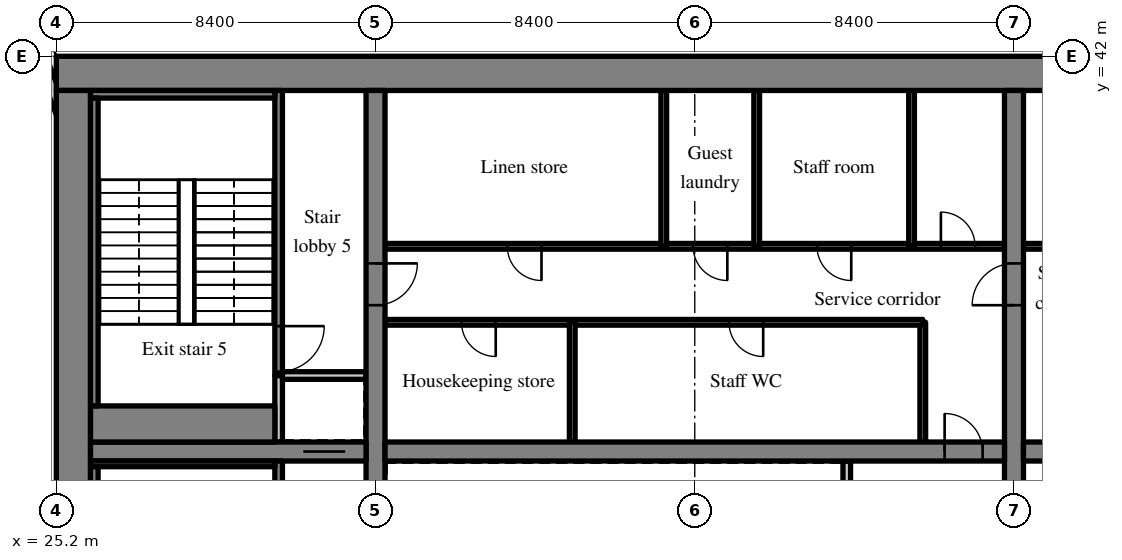
"""IFC4 building model, lengths in metres.
Left out: names, types, materials, properties, quantities, classifications, styles, units other than length and angle.
Written with IfcOpenShell. Run it as: python <this file> out.ifc"""

import sys

from ifc_helpers import new_model, si_unit, direction, frame, frame_2d, origin, place, context, subcontext, project, spatial, rectangle, extrude, source, transform, mapped, element, fill, save


model = new_model("IFC4")
c1 = context("Model", 3, precision=1e-05, world=origin(), true_north=direction((0.0, 1.0)))
c2 = subcontext(c1, "Body", "Model", "MODEL_VIEW")
j1 = project(units=[si_unit("LENGTHUNIT", "METRE"), si_unit("PLANEANGLEUNIT", "RADIAN")], contexts=[c1])
p1 = place(None, origin())
s1 = spatial("IfcSite", under=j1, at=p1, CompositionType="ELEMENT")
p2 = place(p1, origin())
s2 = spatial("IfcBuilding", under=s1, at=p2, CompositionType="ELEMENT")
p3 = place(p2, frame((0.0, 0.0, 91.4)))
s3 = spatial("IfcBuildingStorey", under=s2, at=p3, CompositionType="ELEMENT", Elevation=91.4)
m1 = source(origin(), c2, "Body", "SweptSolid", [
    extrude(rectangle(XDim=50.4, YDim=0.9, at=frame_2d((25.2, 0.0))), origin(), (0.0, 0.0, 1.0), 3.52),
])
p4 = place(p3, frame((25.2, 41.55, 0.0), z_axis=(0.0, 0.0, 1.0), x_axis=(1.0, 0.0, 0.0)))
e1 = element("IfcWall", 1, at=p4, inside=s3, PredefinedType="SHEAR", context=c2, shape_type="MappedRepresentation", body=[
    mapped(m1, transform((0.0, 0.0, 0.0), scale=1.0)),
])
m2 = source(origin(), c2, "Body", "SweptSolid", [
    extrude(rectangle(XDim=18.2, YDim=0.9, at=frame_2d((9.1, 0.0))), origin(), (0.0, 0.0, 1.0), 3.52),
])
p5 = place(p3, frame((25.65, 22.9, 0.0), z_axis=(0.0, 0.0, 1.0), x_axis=(0.0, 1.0, 0.0)))
e2 = element("IfcWall", 2, at=p5, inside=s3, PredefinedType="SHEAR", context=c2, shape_type="MappedRepresentation", body=[
    mapped(m2, transform((0.0, 0.0, 0.0), scale=1.0)),
])
m3 = source(origin(), c2, "Body", "SweptSolid", [
    extrude(rectangle(XDim=18.2, YDim=0.5, at=frame_2d((9.1, 0.0))), origin(), (0.0, 0.0, 1.0), 3.52),
])
p6 = place(p3, frame((33.6, 22.9, 0.0), z_axis=(0.0, 0.0, 1.0), x_axis=(0.0, 1.0, 0.0)))
e3 = element("IfcWall", 3, at=p6, inside=s3, PredefinedType="SHEAR", context=c2, shape_type="MappedRepresentation", body=[
    mapped(m3, transform((0.0, 0.0, 0.0), scale=1.0)),
])
m4 = source(origin(), c2, "Body", "SweptSolid", [
    extrude(rectangle(XDim=1.1, YDim=2.1, at=frame_2d((0.55, 1.05))), frame((0.0, 0.26, 0.0), z_axis=(0.0, -1.0, 0.0), x_axis=(1.0, 0.0, 0.0)), (0.0, 0.0, 1.0), 0.52),
])
p7 = place(p6, frame((12.55, 0.0, 0.0)))
e4 = element("IfcOpeningElement", 4, at=p7, cuts=e3, PredefinedType="OPENING", context=c2, shape_type="MappedRepresentation", body=[
    mapped(m4, transform((0.0, 0.0, 0.0), scale=1.0)),
])
p8 = place(p3, frame((50.4, 22.9, 0.0), z_axis=(0.0, 0.0, 1.0), x_axis=(0.0, 1.0, 0.0)))
e5 = element("IfcWall", 5, at=p8, inside=s3, PredefinedType="SHEAR", context=c2, shape_type="MappedRepresentation", body=[
    mapped(m3, transform((0.0, 0.0, 0.0), scale=1.0)),
])
p9 = place(p8, frame((12.55, 0.0, 0.0)))
e6 = element("IfcOpeningElement", 6, at=p9, cuts=e5, PredefinedType="OPENING", context=c2, shape_type="MappedRepresentation", body=[
    mapped(m4, transform((0.0, 0.0, 0.0), scale=1.0)),
])
m5 = source(origin(), c2, "Body", "SweptSolid", [
    extrude(rectangle(XDim=7.25, YDim=0.5, at=frame_2d((3.625, 0.0))), origin(), (0.0, 0.0, 1.0), 3.52),
])
p10 = place(p3, frame((26.1, 31.6, 0.0), z_axis=(0.0, 0.0, 1.0), x_axis=(1.0, 0.0, 0.0)))
e7 = element("IfcWall", 7, at=p10, inside=s3, PredefinedType="SHEAR", context=c2, shape_type="MappedRepresentation", body=[
    mapped(m5, transform((0.0, 0.0, 0.0), scale=1.0)),
])
p11 = place(p10, frame((5.6, 0.0, 0.0)))
e8 = element("IfcOpeningElement", 8, at=p11, cuts=e7, PredefinedType="OPENING", context=c2, shape_type="MappedRepresentation", body=[
    mapped(m4, transform((0.0, 0.0, 0.0), scale=1.0)),
])
m6 = source(origin(), c2, "Body", "SweptSolid", [
    extrude(rectangle(XDim=16.3, YDim=0.5, at=frame_2d((8.15, 0.0))), origin(), (0.0, 0.0, 1.0), 3.52),
])
p12 = place(p3, frame((33.85, 31.6, 0.0), z_axis=(0.0, 0.0, 1.0), x_axis=(1.0, 0.0, 0.0)))
e9 = element("IfcWall", 9, at=p12, inside=s3, PredefinedType="SHEAR", context=c2, shape_type="MappedRepresentation", body=[
    mapped(m6, transform((0.0, 0.0, 0.0), scale=1.0)),
])
m7 = source(origin(), c2, "Body", "SweptSolid", [
    extrude(rectangle(XDim=1.0, YDim=2.1, at=frame_2d((0.5, 1.05))), frame((0.0, 0.26, 0.0), z_axis=(0.0, -1.0, 0.0), x_axis=(1.0, 0.0, 0.0)), (0.0, 0.0, 1.0), 0.52),
])
p13 = place(p12, frame((14.725, 0.0, 0.0)))
e10 = element("IfcOpeningElement", 10, at=p13, cuts=e9, PredefinedType="OPENING", context=c2, shape_type="MappedRepresentation", body=[
    mapped(m7, transform((0.0, 0.0, 0.0), scale=1.0)),
])
m8 = source(origin(), c2, "Body", "SweptSolid", [
    extrude(rectangle(XDim=16.3, YDim=0.5, at=frame_2d((8.15, 0.0))), origin(), (0.0, 0.0, 1.0), 3.52),
])
p14 = place(p3, frame((50.65, 31.6, 0.0), z_axis=(0.0, 0.0, 1.0), x_axis=(1.0, 0.0, 0.0)))
e11 = element("IfcWall", 11, at=p14, inside=s3, PredefinedType="SHEAR", context=c2, shape_type="MappedRepresentation", body=[
    mapped(m8, transform((0.0, 0.0, 0.0), scale=1.0)),
])
p15 = place(p14, frame((0.575, 0.0, 0.0)))
e12 = element("IfcOpeningElement", 12, at=p15, cuts=e11, PredefinedType="OPENING", context=c2, shape_type="MappedRepresentation", body=[
    mapped(m7, transform((0.0, 0.0, 0.0), scale=1.0)),
])
m9 = source(origin(), c2, "Body", "SweptSolid", [
    extrude(rectangle(XDim=3.559, YDim=0.3, at=frame_2d((1.78, 0.0))), origin(), (0.0, 0.0, 1.0), 3.52),
])
p16 = place(p3, frame((25.55, 39.969, 0.0), z_axis=(0.0, 0.0, 1.0), x_axis=(-0.35779745313, 0.933799219604, 0.0)))
e13 = element("IfcWall", 13, at=p16, inside=s3, PredefinedType="SOLIDWALL", context=c2, shape_type="MappedRepresentation", body=[
    mapped(m9, transform((0.0, 0.0, 0.0), scale=1.0)),
])
m10 = source(origin(), c2, "Body", "SweptSolid", [
    extrude(rectangle(XDim=1.5, YDim=2.0, at=frame_2d((0.75, 1.0))), frame((0.0, 0.16, 0.0), z_axis=(0.0, -1.0, 0.0), x_axis=(1.0, 0.0, 0.0)), (0.0, 0.0, 1.0), 0.32),
])
p17 = place(p16, frame((1.903, 0.0, 0.9)))
e14 = element("IfcOpeningElement", 14, at=p17, cuts=e13, PredefinedType="OPENING", context=c2, shape_type="MappedRepresentation", body=[
    mapped(m10, transform((0.0, 0.0, 0.0), scale=1.0)),
])
m11 = source(origin(), c2, "Body", "SweptSolid", [
    extrude(rectangle(XDim=2.55, YDim=0.2, at=frame_2d((1.275, 0.0))), origin(), (0.0, 0.0, 1.0), 3.52),
])
p18 = place(p3, frame((46.0, 28.8, 0.0), z_axis=(0.0, 0.0, 1.0), x_axis=(0.0, 1.0, 0.0)))
e15 = element("IfcWall", 15, at=p18, inside=s3, PredefinedType="SOLIDWALL", context=c2, shape_type="MappedRepresentation", body=[
    mapped(m11, transform((0.0, 0.0, 0.0), scale=1.0)),
])
m12 = source(origin(), c2, "Body", "SweptSolid", [
    extrude(rectangle(XDim=3.15, YDim=0.15, at=frame_2d((1.575, 0.0))), origin(), (0.0, 0.0, 1.0), 3.52),
])
p19 = place(p3, frame((48.0, 31.85, 0.0), z_axis=(0.0, 0.0, 1.0), x_axis=(0.0, 1.0, 0.0)))
e16 = element("IfcWall", 16, at=p19, inside=s3, PredefinedType="PARTITIONING", context=c2, shape_type="MappedRepresentation", body=[
    mapped(m12, transform((0.0, 0.0, 0.0), scale=1.0)),
])
m13 = source(origin(), c2, "Body", "SweptSolid", [
    extrude(rectangle(XDim=14.15, YDim=0.15, at=frame_2d((7.075, 0.0))), origin(), (0.0, 0.0, 1.0), 3.52),
])
p20 = place(p3, frame((33.85, 35.0, 0.0), z_axis=(0.0, 0.0, 1.0), x_axis=(1.0, 0.0, 0.0)))
e17 = element("IfcWall", 17, at=p20, inside=s3, PredefinedType="PARTITIONING", context=c2, shape_type="MappedRepresentation", body=[
    mapped(m13, transform((0.0, 0.0, 0.0), scale=1.0)),
])
m14 = source(origin(), c2, "Body", "SweptSolid", [
    extrude(rectangle(XDim=0.9, YDim=2.1, at=frame_2d((0.45, 1.05))), frame((0.0, 0.085, 0.0), z_axis=(0.0, -1.0, 0.0), x_axis=(1.0, 0.0, 0.0)), (0.0, 0.0, 1.0), 0.17),
])
p21 = place(p20, frame((2.013, 0.0, 0.0)))
e18 = element("IfcOpeningElement", 18, at=p21, cuts=e17, PredefinedType="OPENING", context=c2, shape_type="MappedRepresentation", body=[
    mapped(m14, transform((0.0, 0.0, 0.0), scale=1.0)),
])
p22 = place(p20, frame((9.051, 0.0, 0.0)))
e19 = element("IfcOpeningElement", 19, at=p22, cuts=e17, PredefinedType="OPENING", context=c2, shape_type="MappedRepresentation", body=[
    mapped(m14, transform((0.0, 0.0, 0.0), scale=1.0)),
])
m15 = source(origin(), c2, "Body", "SweptSolid", [
    extrude(rectangle(XDim=16.3, YDim=0.15, at=frame_2d((8.15, 0.0))), origin(), (0.0, 0.0, 1.0), 3.52),
])
p23 = place(p3, frame((33.85, 37.0, 0.0), z_axis=(0.0, 0.0, 1.0), x_axis=(1.0, 0.0, 0.0)))
e20 = element("IfcWall", 20, at=p23, inside=s3, PredefinedType="PARTITIONING", context=c2, shape_type="MappedRepresentation", body=[
    mapped(m15, transform((0.0, 0.0, 0.0), scale=1.0)),
])
p24 = place(p23, frame((3.217, 0.0, 0.0)))
e21 = element("IfcOpeningElement", 21, at=p24, cuts=e20, PredefinedType="OPENING", context=c2, shape_type="MappedRepresentation", body=[
    mapped(m14, transform((0.0, 0.0, 0.0), scale=1.0)),
])
p25 = place(p23, frame((8.107, 0.0, 0.0)))
e22 = element("IfcOpeningElement", 22, at=p25, cuts=e20, PredefinedType="OPENING", context=c2, shape_type="MappedRepresentation", body=[
    mapped(m14, transform((0.0, 0.0, 0.0), scale=1.0)),
])
p26 = place(p23, frame((11.368, 0.0, 0.0)))
e23 = element("IfcOpeningElement", 23, at=p26, cuts=e20, PredefinedType="OPENING", context=c2, shape_type="MappedRepresentation", body=[
    mapped(m14, transform((0.0, 0.0, 0.0), scale=1.0)),
])
p27 = place(p23, frame((14.627, 0.0, 0.0)))
e24 = element("IfcOpeningElement", 24, at=p27, cuts=e20, PredefinedType="OPENING", context=c2, shape_type="MappedRepresentation", body=[
    mapped(m14, transform((0.0, 0.0, 0.0), scale=1.0)),
])
p28 = place(p3, frame((38.776, 31.85, 0.0), z_axis=(0.0, 0.0, 1.0), x_axis=(0.0, 1.0, 0.0)))
e25 = element("IfcWall", 25, at=p28, inside=s3, PredefinedType="PARTITIONING", context=c2, shape_type="MappedRepresentation", body=[
    mapped(m12, transform((0.0, 0.0, 0.0), scale=1.0)),
])
m16 = source(origin(), c2, "Body", "SweptSolid", [
    extrude(rectangle(XDim=4.1, YDim=0.15, at=frame_2d((2.05, 0.0))), origin(), (0.0, 0.0, 1.0), 3.52),
])
for number, where, z_axis, x_axis in (
    (26, (41.185, 37.0, 0.0), (0.0, 0.0, 1.0), (0.0, 1.0, 0.0)),
    (27, (43.63, 37.0, 0.0), (0.0, 0.0, 1.0), (0.0, 1.0, 0.0)),
    (28, (47.705, 37.0, 0.0), (0.0, 0.0, 1.0), (0.0, 1.0, 0.0)),
):
    element("IfcWall", number, at=place(p3, frame(where, z_axis=z_axis, x_axis=x_axis)), inside=s3, PredefinedType="PARTITIONING", context=c2, shape_type="MappedRepresentation", body=[
        mapped(m16, transform((0.0, 0.0, 0.0), scale=1.0)),
    ])
m17 = source(origin(), c2, "Body", "SweptSolid", [
    extrude(rectangle(XDim=16.3, YDim=0.15, at=frame_2d((8.15, 0.0))), origin(), (0.0, 0.0, 1.0), 3.52),
])
p29 = place(p3, frame((66.95, 37.0, 0.0), z_axis=(0.0, 0.0, 1.0), x_axis=(-1.0, 0.0, 0.0)))
e29 = element("IfcWall", 29, at=p29, inside=s3, PredefinedType="PARTITIONING", context=c2, shape_type="MappedRepresentation", body=[
    mapped(m17, transform((0.0, 0.0, 0.0), scale=1.0)),
])
p30 = place(p29, frame((0.773, 0.0, 0.0)))
e30 = element("IfcOpeningElement", 30, at=p30, cuts=e29, PredefinedType="OPENING", context=c2, shape_type="MappedRepresentation", body=[
    mapped(m14, transform((0.0, 0.0, 0.0), scale=1.0)),
])
p31 = place(p29, frame((3.625, 0.0, 0.0)))
e31 = element("IfcOpeningElement", 31, at=p31, cuts=e29, PredefinedType="OPENING", context=c2, shape_type="MappedRepresentation", body=[
    mapped(m14, transform((0.0, 0.0, 0.0), scale=1.0)),
])
p32 = place(p29, frame((9.33, 0.0, 0.0)))
e32 = element("IfcOpeningElement", 32, at=p32, cuts=e29, PredefinedType="OPENING", context=c2, shape_type="MappedRepresentation", body=[
    mapped(m14, transform((0.0, 0.0, 0.0), scale=1.0)),
])
p33 = place(p29, frame((14.627, 0.0, 0.0)))
e33 = element("IfcOpeningElement", 33, at=p33, cuts=e29, PredefinedType="OPENING", context=c2, shape_type="MappedRepresentation", body=[
    mapped(m14, transform((0.0, 0.0, 0.0), scale=1.0)),
])
m18 = source(origin(), c2, "Body", "SweptSolid", [
    extrude(rectangle(XDim=8.45, YDim=0.2, at=frame_2d((4.225, 0.0))), origin(), (0.0, 0.0, 1.0), 3.52),
])
p34 = place(p3, frame((31.05, 22.9, 0.0), z_axis=(0.0, 0.0, 1.0), x_axis=(0.0, 1.0, 0.0)))
e34 = element("IfcWall", 34, at=p34, inside=s3, PredefinedType="SOLIDWALL", context=c2, shape_type="MappedRepresentation", body=[
    mapped(m18, transform((0.0, 0.0, 0.0), scale=1.0)),
])
m19 = source(origin(), c2, "Body", "SweptSolid", [
    extrude(rectangle(XDim=1.2, YDim=2.1, at=frame_2d((0.6, 1.05))), frame((0.0, 0.11, 0.0), z_axis=(0.0, -1.0, 0.0), x_axis=(1.0, 0.0, 0.0)), (0.0, 0.0, 1.0), 0.22),
])
p35 = place(p34, frame((0.7, 0.0, 0.0)))
e35 = element("IfcOpeningElement", 35, at=p35, cuts=e34, PredefinedType="OPENING", context=c2, shape_type="MappedRepresentation", body=[
    mapped(m19, transform((0.0, 0.0, 0.0), scale=1.0)),
])
m20 = source(origin(), c2, "Body", "SweptSolid", [
    extrude(rectangle(XDim=1.75, YDim=0.2, at=frame_2d((0.875, 0.0))), origin(), (0.0, 0.0, 1.0), 3.52),
])
p36 = place(p3, frame((31.05, 31.85, 0.0), z_axis=(0.0, 0.0, 1.0), x_axis=(0.0, 1.0, 0.0)))
e36 = element("IfcWall", 36, at=p36, inside=s3, PredefinedType="SOLIDWALL", context=c2, shape_type="MappedRepresentation", body=[
    mapped(m20, transform((0.0, 0.0, 0.0), scale=1.0)),
])
m21 = source(origin(), c2, "Body", "SweptSolid", [
    extrude(rectangle(XDim=2.2, YDim=0.2, at=frame_2d((1.1, 0.0))), origin(), (0.0, 0.0, 1.0), 3.52),
])
p37 = place(p3, frame((31.15, 33.6, 0.0), z_axis=(0.0, 0.0, 1.0), x_axis=(1.0, 0.0, 0.0)))
e37 = element("IfcWall", 37, at=p37, inside=s3, PredefinedType="SOLIDWALL", context=c2, shape_type="MappedRepresentation", body=[
    mapped(m21, transform((0.0, 0.0, 0.0), scale=1.0)),
])
m22 = source(origin(), c2, "Body", "SweptSolid", [
    extrude(rectangle(XDim=7.5, YDim=0.2, at=frame_2d((3.75, 0.0))), origin(), (0.0, 0.0, 1.0), 3.52),
])
p38 = place(p3, frame((31.05, 33.6, 0.0), z_axis=(0.0, 0.0, 1.0), x_axis=(0.0, 1.0, 0.0)))
e38 = element("IfcWall", 38, at=p38, inside=s3, PredefinedType="SOLIDWALL", context=c2, shape_type="MappedRepresentation", body=[
    mapped(m22, transform((0.0, 0.0, 0.0), scale=1.0)),
])
p39 = place(p38, frame((0.1, 0.0, 0.0)))
e39 = element("IfcOpeningElement", 39, at=p39, cuts=e38, PredefinedType="OPENING", context=c2, shape_type="MappedRepresentation", body=[
    mapped(m19, transform((0.0, 0.0, 0.0), scale=1.0)),
])
m23 = source(origin(), c2, "Body", "SweptSolid", [
    extrude(rectangle(XDim=4.85, YDim=0.15, at=frame_2d((2.425, 0.0))), origin(), (0.0, 0.0, 1.0), 3.52),
])
p40 = place(p3, frame((26.1, 31.275, 0.0), z_axis=(0.0, 0.0, 1.0), x_axis=(1.0, 0.0, 0.0)))
e40 = element("IfcWall", 40, at=p40, inside=s3, PredefinedType="SOLIDWALL", context=c2, shape_type="MappedRepresentation", body=[
    mapped(m23, transform((0.0, 0.0, 0.0), scale=1.0)),
])
m24 = source(origin(), c2, "Body", "SweptSolid", [
    extrude(rectangle(XDim=8.1, YDim=0.2, at=frame_2d((4.05, 0.0))), origin(), (0.0, 0.0, 1.0), 3.52),
])
p41 = place(p3, frame((26.2, 23.1, 0.0), z_axis=(0.0, 0.0, 1.0), x_axis=(0.0, 1.0, 0.0)))
e41 = element("IfcWall", 41, at=p41, inside=s3, PredefinedType="SOLIDWALL", context=c2, shape_type="MappedRepresentation", body=[
    mapped(m24, transform((0.0, 0.0, 0.0), scale=1.0)),
])
m25 = source(origin(), c2, "Body", "SweptSolid", [
    extrude(rectangle(XDim=4.85, YDim=0.2, at=frame_2d((2.425, 0.0))), origin(), (0.0, 0.0, 1.0), 3.52),
])
p42 = place(p3, frame((26.1, 41.0, 0.0), z_axis=(0.0, 0.0, 1.0), x_axis=(1.0, 0.0, 0.0)))
e42 = element("IfcWall", 42, at=p42, inside=s3, PredefinedType="SOLIDWALL", context=c2, shape_type="MappedRepresentation", body=[
    mapped(m25, transform((0.0, 0.0, 0.0), scale=1.0)),
])
m26 = source(origin(), c2, "Body", "SweptSolid", [
    extrude(rectangle(XDim=4.85, YDim=0.95, at=frame_2d((2.425, 0.0))), origin(), (0.0, 0.0, 1.0), 3.52),
])
p43 = place(p3, frame((26.1, 32.325, 0.0), z_axis=(0.0, 0.0, 1.0), x_axis=(1.0, 0.0, 0.0)))
e43 = element("IfcWall", 43, at=p43, inside=s3, PredefinedType="SOLIDWALL", context=c2, shape_type="MappedRepresentation", body=[
    mapped(m26, transform((0.0, 0.0, 0.0), scale=1.0)),
])
p44 = place(p3, frame((26.2, 32.8, 0.0), z_axis=(0.0, 0.0, 1.0), x_axis=(0.0, 1.0, 0.0)))
e44 = element("IfcWall", 44, at=p44, inside=s3, PredefinedType="SOLIDWALL", context=c2, shape_type="MappedRepresentation", body=[
    mapped(m24, transform((0.0, 0.0, 0.0), scale=1.0)),
])
m27 = source(origin(), c2, "Body", "SweptSolid", [
    extrude(rectangle(XDim=1.0, YDim=2.1, at=frame_2d((0.5, 1.05))), frame((0.0, 0.025, 0.0), z_axis=(0.0, -1.0, 0.0), x_axis=(1.0, 0.0, 0.0)), (0.0, 0.0, 1.0), 0.05),
])
p45 = place(p13, origin())
e45 = element("IfcDoor", 45, at=p45, inside=s3, OperationType="SINGLE_SWING_LEFT", PredefinedType="DOOR", context=c2, shape_type="MappedRepresentation", body=[
    mapped(m27, transform((0.0, 0.0, 0.0), scale=1.0)),
])
fill(e10, e45)
m28 = source(origin(), c2, "Body", "SweptSolid", [
    extrude(rectangle(XDim=0.9, YDim=2.1, at=frame_2d((0.45, 1.05))), frame((0.0, 0.025, 0.0), z_axis=(0.0, -1.0, 0.0), x_axis=(1.0, 0.0, 0.0)), (0.0, 0.0, 1.0), 0.05),
])
p46 = place(p21, origin())
e46 = element("IfcDoor", 46, at=p46, inside=s3, OperationType="SINGLE_SWING_RIGHT", PredefinedType="DOOR", context=c2, shape_type="MappedRepresentation", body=[
    mapped(m28, transform((0.0, 0.0, 0.0), scale=1.0)),
])
fill(e18, e46)
p47 = place(p22, origin())
e47 = element("IfcDoor", 47, at=p47, inside=s3, OperationType="SINGLE_SWING_RIGHT", PredefinedType="DOOR", context=c2, shape_type="MappedRepresentation", body=[
    mapped(m28, transform((0.0, 0.0, 0.0), scale=1.0)),
])
fill(e19, e47)
p48 = place(p24, origin())
e48 = element("IfcDoor", 48, at=p48, inside=s3, OperationType="SINGLE_SWING_RIGHT", PredefinedType="DOOR", context=c2, shape_type="MappedRepresentation", body=[
    mapped(m28, transform((0.0, 0.0, 0.0), scale=1.0)),
])
fill(e21, e48)
p49 = place(p25, origin())
e49 = element("IfcDoor", 49, at=p49, inside=s3, OperationType="SINGLE_SWING_RIGHT", PredefinedType="DOOR", context=c2, shape_type="MappedRepresentation", body=[
    mapped(m28, transform((0.0, 0.0, 0.0), scale=1.0)),
])
fill(e22, e49)
p50 = place(p26, origin())
e50 = element("IfcDoor", 50, at=p50, inside=s3, OperationType="SINGLE_SWING_RIGHT", PredefinedType="DOOR", context=c2, shape_type="MappedRepresentation", body=[
    mapped(m28, transform((0.0, 0.0, 0.0), scale=1.0)),
])
fill(e23, e50)
p51 = place(p27, origin())
e51 = element("IfcDoor", 51, at=p51, inside=s3, OperationType="SINGLE_SWING_LEFT", PredefinedType="DOOR", context=c2, shape_type="MappedRepresentation", body=[
    mapped(m28, transform((0.0, 0.0, 0.0), scale=1.0)),
])
fill(e24, e51)
m29 = source(origin(), c2, "Body", "SweptSolid", [
    extrude(rectangle(XDim=1.1, YDim=2.1, at=frame_2d((0.55, 1.05))), frame((0.0, 0.025, 0.0), z_axis=(0.0, -1.0, 0.0), x_axis=(1.0, 0.0, 0.0)), (0.0, 0.0, 1.0), 0.05),
])
p52 = place(p11, origin())
e52 = element("IfcDoor", 52, at=p52, inside=s3, OperationType="SLIDING_TO_RIGHT", PredefinedType="DOOR", context=c2, shape_type="MappedRepresentation", body=[
    mapped(m29, transform((0.0, 0.0, 0.0), scale=1.0)),
])
fill(e8, e52)
m30 = source(origin(), c2, "Body", "SweptSolid", [
    extrude(rectangle(XDim=1.2, YDim=2.1, at=frame_2d((0.6, 1.05))), frame((0.0, 0.025, 0.0), z_axis=(0.0, -1.0, 0.0), x_axis=(1.0, 0.0, 0.0)), (0.0, 0.0, 1.0), 0.05),
])
p53 = place(p39, origin())
e53 = element("IfcDoor", 53, at=p53, inside=s3, OperationType="SINGLE_SWING_RIGHT", PredefinedType="DOOR", context=c2, shape_type="MappedRepresentation", body=[
    mapped(m30, transform((0.0, 0.0, 0.0), scale=1.0)),
])
fill(e39, e53)
p54 = place(p7, origin())
e54 = element("IfcDoor", 54, at=p54, inside=s3, OperationType="SINGLE_SWING_RIGHT", PredefinedType="DOOR", context=c2, shape_type="MappedRepresentation", body=[
    mapped(m29, transform((0.0, 0.0, 0.0), scale=1.0)),
])
fill(e4, e54)
p55 = place(p9, origin())
e55 = element("IfcDoor", 55, at=p55, inside=s3, OperationType="SINGLE_SWING_LEFT", PredefinedType="DOOR", context=c2, shape_type="MappedRepresentation", body=[
    mapped(m29, transform((0.0, 0.0, 0.0), scale=1.0)),
])
fill(e6, e55)
save(model, sys.argv[1])
